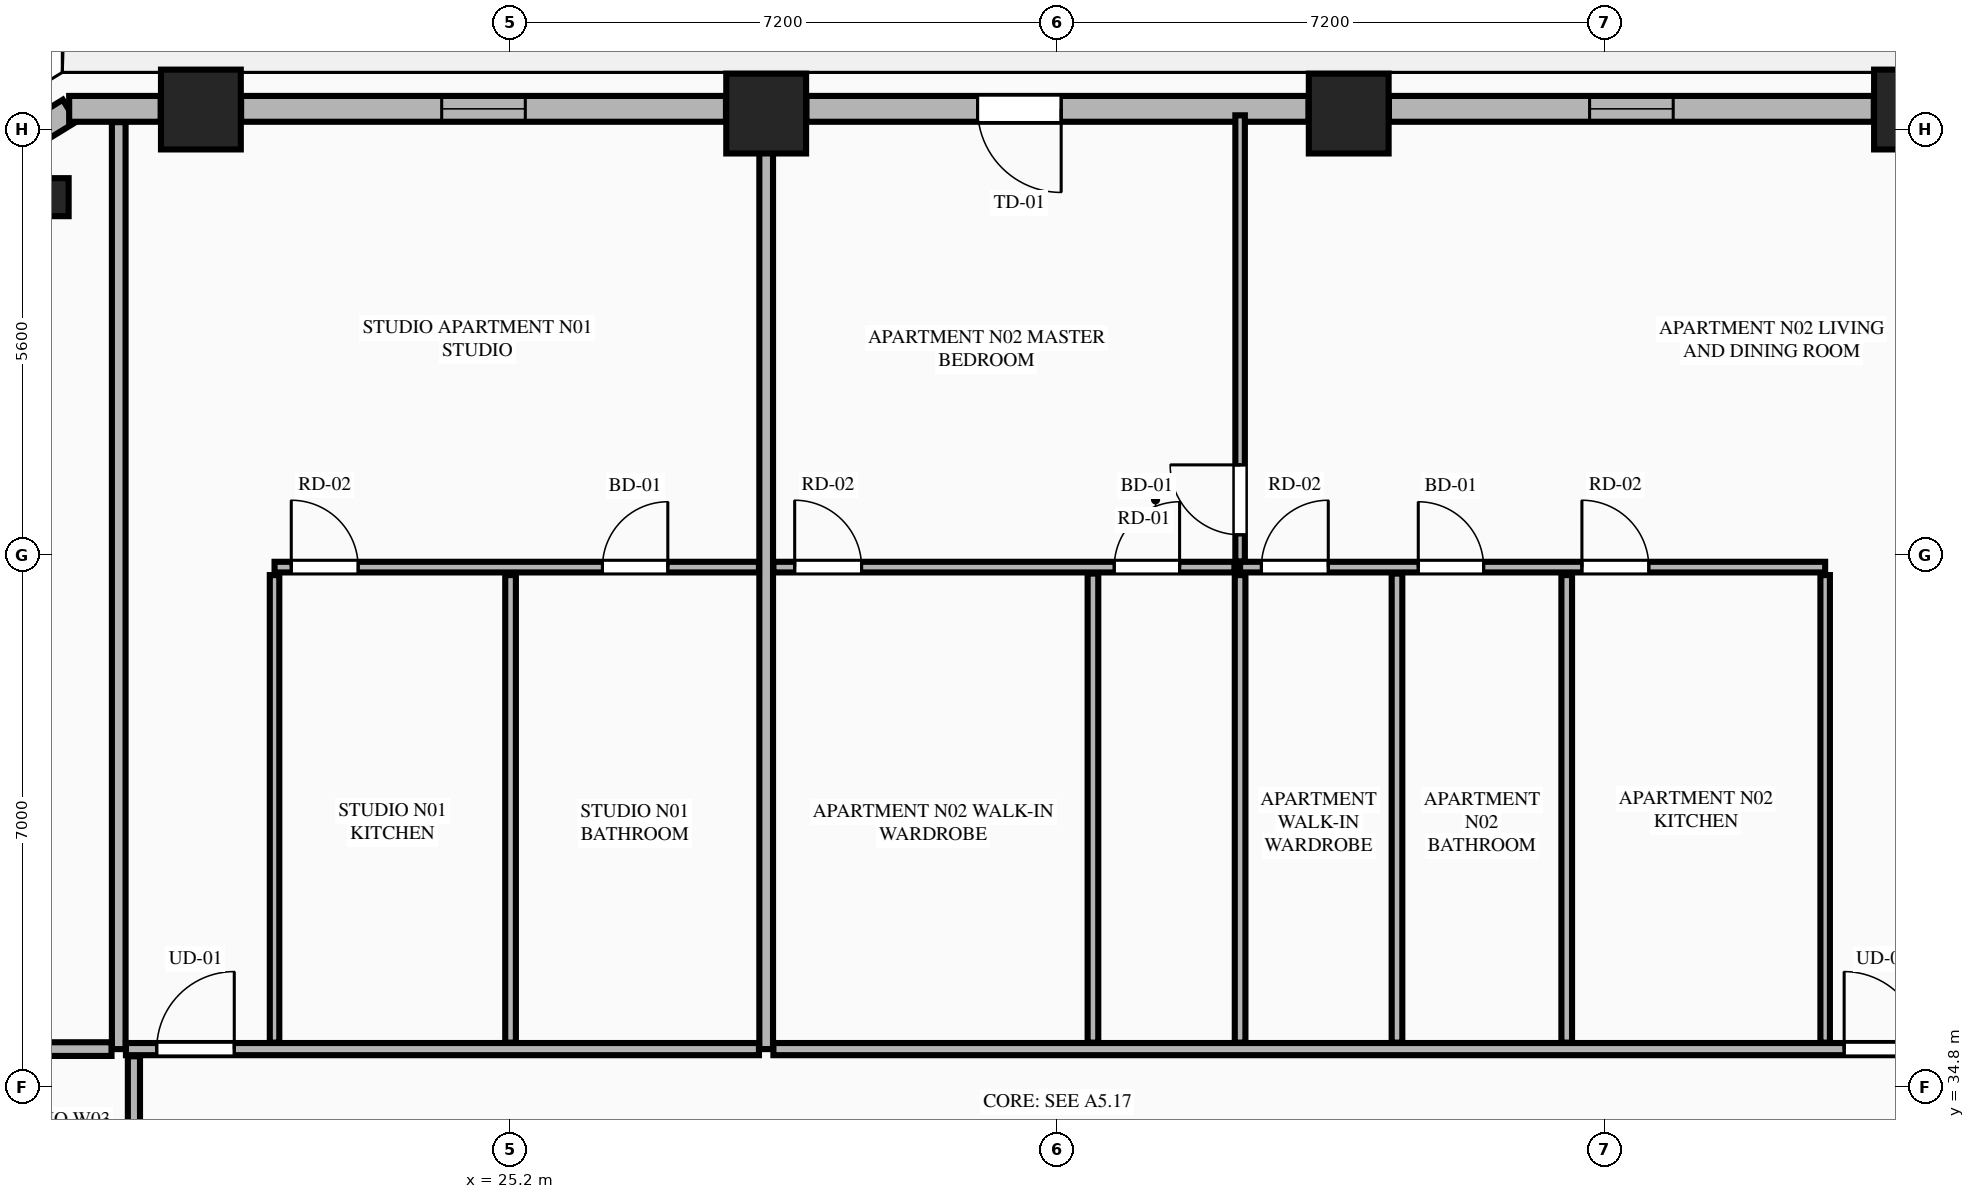
"""IFC4 building model, lengths in metres.
Left out: names, types, materials, properties, quantities, classifications, styles, units other than length and angle.
Written with IfcOpenShell. Run it as: python <this file> out.ifc"""

import sys

from ifc_helpers import new_model, si_unit, direction, frame, frame_2d, origin, origin_2d, place, context, subcontext, project, spatial, rectangle, extrude, element, fill, save


model = new_model("IFC4")
c1 = context("Model", 3, precision=1e-05, world=origin(), true_north=direction((0.0, 1.0)))
c2 = subcontext(c1, "Body", "Model", "MODEL_VIEW")
j1 = project(units=[si_unit("LENGTHUNIT", "METRE"), si_unit("PLANEANGLEUNIT", "RADIAN")], contexts=[c1])
p1 = place(None, origin())
s1 = spatial("IfcSite", under=j1, at=p1, CompositionType="ELEMENT")
p2 = place(p1, origin())
s2 = spatial("IfcBuilding", under=s1, at=p2, CompositionType="ELEMENT")
p3 = place(p2, frame((0.0, 0.0, 133.9)))
s3 = spatial("IfcBuildingStorey", under=s2, at=p3, CompositionType="ELEMENT", Elevation=133.9)
for number, where, z_axis, x_axis in (
    (1, (43.669, 47.661, 0.0), (0.0, 0.0, 1.0), (1.0, 0.0, 0.0)),
    (2, (36.232, 47.608, 0.0), (0.0, 0.0, 1.0), (1.0, 0.0, 0.0)),
    (3, (28.568, 47.608, 0.0), (0.0, 0.0, 1.0), (1.0, 0.0, 0.0)),
    (4, (21.131, 47.661, 0.0), (0.0, 0.0, 1.0), (1.0, 0.0, 0.0)),
):
    element("IfcColumn", number, at=place(p3, frame(where, z_axis=z_axis, x_axis=x_axis)), inside=s3, PredefinedType="COLUMN", context=c2, shape_type="SweptSolid", body=[
        extrude(rectangle(XDim=1.05, YDim=1.05, at=origin_2d()), origin(), (0.0, 0.0, 1.0), 3.55),
    ])
p4 = place(p3, frame((19.141, 46.508, 0.0), z_axis=(0.0, 0.0, 1.0), x_axis=(-0.865160173452, -0.501495637342, 0.0)))
e5 = element("IfcColumn", 5, at=p4, inside=s3, PredefinedType="PILASTER", context=c2, shape_type="SweptSolid", body=[
    extrude(rectangle(XDim=0.5, YDim=0.35, at=origin_2d()), origin(), (0.0, 0.0, 1.0), 3.55),
])
p5 = place(p3, frame((19.403, 47.645, 0.0), z_axis=(0.0, 0.0, 1.0), x_axis=(-0.851798915137, -0.523868884523, 0.0)))
e6 = element("IfcWall", 6, at=p5, inside=s3, PredefinedType="STANDARD", context=c2, shape_type="SweptSolid", body=[
    extrude(rectangle(XDim=1.848, YDim=0.34, at=frame_2d((0.924, 0.0))), origin(), (0.0, 0.0, 1.0), 3.34),
])
p6 = place(p3, frame((43.14, 47.67, 0.0), z_axis=(0.0, 0.0, 1.0), x_axis=(-1.0, 0.0, 0.0)))
e7 = element("IfcWall", 7, at=p6, inside=s3, PredefinedType="STANDARD", context=c2, shape_type="SweptSolid", body=[
    extrude(rectangle(XDim=6.379, YDim=0.34, at=frame_2d((3.189, 0.0))), origin(), (0.0, 0.0, 1.0), 2.797),
])
p7 = place(p6, frame((2.639, 0.0, 0.75)))
e8 = element("IfcOpeningElement", 8, at=p7, cuts=e7, PredefinedType="OPENING", context=c2, shape_type="SweptSolid", body=[
    extrude(rectangle(XDim=1.1, YDim=1.897, at=frame_2d((0.55, 0.948))), frame((0.0, 0.18, 0.0), z_axis=(0.0, -1.0, 0.0), x_axis=(1.0, 0.0, 0.0)), (0.0, 0.0, 1.0), 0.36),
])
p8 = place(p3, frame((35.703, 47.67, 0.0), z_axis=(0.0, 0.0, 1.0), x_axis=(-1.0, 0.0, 0.0)))
e9 = element("IfcWall", 9, at=p8, inside=s3, PredefinedType="STANDARD", context=c2, shape_type="SweptSolid", body=[
    extrude(rectangle(XDim=6.606, YDim=0.34, at=frame_2d((3.303, 0.0))), origin(), (0.0, 0.0, 1.0), 2.797),
])
p9 = place(p8, frame((3.254, 0.0, 0.0)))
e10 = element("IfcOpeningElement", 10, at=p9, cuts=e9, PredefinedType="OPENING", context=c2, shape_type="SweptSolid", body=[
    extrude(rectangle(XDim=1.1, YDim=2.25, at=frame_2d((0.55, 1.125))), frame((0.0, 0.18, 0.0), z_axis=(0.0, -1.0, 0.0), x_axis=(1.0, 0.0, 0.0)), (0.0, 0.0, 1.0), 0.36),
])
p10 = place(p3, frame((28.039, 47.67, 0.0), z_axis=(0.0, 0.0, 1.0), x_axis=(-1.0, 0.0, 0.0)))
e11 = element("IfcWall", 11, at=p10, inside=s3, PredefinedType="STANDARD", context=c2, shape_type="SweptSolid", body=[
    extrude(rectangle(XDim=6.379, YDim=0.34, at=frame_2d((3.189, 0.0))), origin(), (0.0, 0.0, 1.0), 2.797),
])
p11 = place(p10, frame((2.64, 0.0, 0.75)))
e12 = element("IfcOpeningElement", 12, at=p11, cuts=e11, PredefinedType="OPENING", context=c2, shape_type="SweptSolid", body=[
    extrude(rectangle(XDim=1.1, YDim=1.897, at=frame_2d((0.55, 0.948))), frame((0.0, 0.18, 0.0), z_axis=(0.0, -1.0, 0.0), x_axis=(1.0, 0.0, 0.0)), (0.0, 0.0, 1.0), 0.36),
])
p12 = place(p3, frame((20.602, 47.67, 0.0), z_axis=(0.0, 0.0, 1.0), x_axis=(-1.0, 0.0, 0.0)))
e13 = element("IfcWall", 13, at=p12, inside=s3, PredefinedType="STANDARD", context=c2, shape_type="SweptSolid", body=[
    extrude(rectangle(XDim=1.204, YDim=0.34, at=frame_2d((0.602, 0.0))), origin(), (0.0, 0.0, 1.0), 3.34),
])
p13 = place(p3, frame((20.05, 35.3, 0.0), z_axis=(0.0, 0.0, 1.0), x_axis=(0.0, 1.0, 0.0)))
e14 = element("IfcWall", 14, at=p13, inside=s3, PredefinedType="PARTITIONING", context=c2, shape_type="SweptSolid", body=[
    extrude(rectangle(XDim=12.195, YDim=0.18, at=frame_2d((6.098, 0.0))), origin(), (0.0, 0.0, 1.0), 3.34),
])
p14 = place(p3, frame((28.568, 35.3, 0.0), z_axis=(0.0, 0.0, 1.0), x_axis=(0.0, 1.0, 0.0)))
e15 = element("IfcWall", 15, at=p14, inside=s3, PredefinedType="PARTITIONING", context=c2, shape_type="SweptSolid", body=[
    extrude(rectangle(XDim=12.195, YDim=0.18, at=frame_2d((6.098, 0.0))), origin(), (0.0, 0.0, 1.0), 2.722),
])
p15 = place(p3, frame((20.145, 35.3, 0.0), z_axis=(0.0, 0.0, 1.0), x_axis=(1.0, 0.0, 0.0)))
e16 = element("IfcWall", 16, at=p15, inside=s3, PredefinedType="PARTITIONING", context=c2, shape_type="SweptSolid", body=[
    extrude(rectangle(XDim=8.328, YDim=0.16, at=frame_2d((4.164, 0.0))), origin(), (0.0, 0.0, 1.0), 3.34),
])
p16 = place(p15, frame((0.405, 0.0, 0.0)))
e17 = element("IfcOpeningElement", 17, at=p16, cuts=e16, PredefinedType="OPENING", context=c2, shape_type="SweptSolid", body=[
    extrude(rectangle(XDim=1.02, YDim=2.25, at=frame_2d((0.51, 1.125))), frame((0.0, 0.09, 0.0), z_axis=(0.0, -1.0, 0.0), x_axis=(1.0, 0.0, 0.0)), (0.0, 0.0, 1.0), 0.18),
])
p17 = place(p3, frame((22.1, 35.385, 0.0), z_axis=(0.0, 0.0, 1.0), x_axis=(0.0, 1.0, 0.0)))
e18 = element("IfcWall", 18, at=p17, inside=s3, PredefinedType="PARTITIONING", context=c2, shape_type="SweptSolid", body=[
    extrude(rectangle(XDim=6.151, YDim=0.125, at=frame_2d((3.075, 0.0))), origin(), (0.0, 0.0, 1.0), 2.722),
])
p18 = place(p3, frame((22.1, 41.641, 0.0), z_axis=(0.0, 0.0, 1.0), x_axis=(1.0, 0.0, 0.0)))
e19 = element("IfcWall", 19, at=p18, inside=s3, PredefinedType="PLUMBINGWALL", context=c2, shape_type="SweptSolid", body=[
    extrude(rectangle(XDim=6.373, YDim=0.14, at=frame_2d((3.187, 0.0))), origin(), (0.0, 0.0, 1.0), 3.34),
])
p19 = place(p18, frame((4.314, 0.0, 0.0)))
e20 = element("IfcOpeningElement", 20, at=p19, cuts=e19, PredefinedType="OPENING", context=c2, shape_type="SweptSolid", body=[
    extrude(rectangle(XDim=0.86, YDim=2.1, at=frame_2d((0.43, 1.05))), frame((0.0, 0.08, 0.0), z_axis=(0.0, -1.0, 0.0), x_axis=(1.0, 0.0, 0.0)), (0.0, 0.0, 1.0), 0.16),
])
p20 = place(p18, frame((0.22, 0.0, 0.0)))
e21 = element("IfcOpeningElement", 21, at=p20, cuts=e19, PredefinedType="OPENING", context=c2, shape_type="SweptSolid", body=[
    extrude(rectangle(XDim=0.88, YDim=2.15, at=frame_2d((0.44, 1.075))), frame((0.0, 0.08, 0.0), z_axis=(0.0, -1.0, 0.0), x_axis=(1.0, 0.0, 0.0)), (0.0, 0.0, 1.0), 0.16),
])
p21 = place(p3, frame((25.205, 35.385, 0.0), z_axis=(0.0, 0.0, 1.0), x_axis=(0.0, 1.0, 0.0)))
e22 = element("IfcWall", 22, at=p21, inside=s3, PredefinedType="PLUMBINGWALL", context=c2, shape_type="SweptSolid", body=[
    extrude(rectangle(XDim=6.151, YDim=0.14, at=frame_2d((3.075, 0.0))), origin(), (0.0, 0.0, 1.0), 3.34),
])
p22 = place(p3, frame((28.663, 35.3, 0.0), z_axis=(0.0, 0.0, 1.0), x_axis=(1.0, 0.0, 0.0)))
e23 = element("IfcWall", 23, at=p22, inside=s3, PredefinedType="PARTITIONING", context=c2, shape_type="SweptSolid", body=[
    extrude(rectangle(XDim=15.992, YDim=0.16, at=frame_2d((7.996, 0.0))), origin(), (0.0, 0.0, 1.0), 3.34),
])
p23 = place(p22, frame((14.087, 0.0, 0.0)))
e24 = element("IfcOpeningElement", 24, at=p23, cuts=e23, PredefinedType="OPENING", context=c2, shape_type="SweptSolid", body=[
    extrude(rectangle(XDim=1.02, YDim=2.25, at=frame_2d((0.51, 1.125))), frame((0.0, 0.09, 0.0), z_axis=(0.0, -1.0, 0.0), x_axis=(1.0, 0.0, 0.0)), (0.0, 0.0, 1.0), 0.18),
])
p24 = place(p3, frame((42.5, 35.385, 0.0), z_axis=(0.0, 0.0, 1.0), x_axis=(0.0, 1.0, 0.0)))
e25 = element("IfcWall", 25, at=p24, inside=s3, PredefinedType="PARTITIONING", context=c2, shape_type="SweptSolid", body=[
    extrude(rectangle(XDim=6.151, YDim=0.125, at=frame_2d((3.075, 0.0))), origin(), (0.0, 0.0, 1.0), 2.722),
])
p25 = place(p3, frame((34.803, 41.641, 0.0), z_axis=(0.0, 0.0, 1.0), x_axis=(1.0, 0.0, 0.0)))
e26 = element("IfcWall", 26, at=p25, inside=s3, PredefinedType="PLUMBINGWALL", context=c2, shape_type="SweptSolid", body=[
    extrude(rectangle(XDim=7.697, YDim=0.14, at=frame_2d((3.849, 0.0))), origin(), (0.0, 0.0, 1.0), 3.34),
])
p26 = place(p25, frame((0.28, 0.0, 0.0)))
e27 = element("IfcOpeningElement", 27, at=p26, cuts=e26, PredefinedType="OPENING", context=c2, shape_type="SweptSolid", body=[
    extrude(rectangle(XDim=0.88, YDim=2.15, at=frame_2d((0.44, 1.075))), frame((0.0, 0.08, 0.0), z_axis=(0.0, -1.0, 0.0), x_axis=(1.0, 0.0, 0.0)), (0.0, 0.0, 1.0), 0.16),
])
p27 = place(p25, frame((2.344, 0.0, 0.0)))
e28 = element("IfcOpeningElement", 28, at=p27, cuts=e26, PredefinedType="OPENING", context=c2, shape_type="SweptSolid", body=[
    extrude(rectangle(XDim=0.86, YDim=2.1, at=frame_2d((0.43, 1.05))), frame((0.0, 0.08, 0.0), z_axis=(0.0, -1.0, 0.0), x_axis=(1.0, 0.0, 0.0)), (0.0, 0.0, 1.0), 0.16),
])
p28 = place(p25, frame((4.497, 0.0, 0.0)))
e29 = element("IfcOpeningElement", 29, at=p28, cuts=e26, PredefinedType="OPENING", context=c2, shape_type="SweptSolid", body=[
    extrude(rectangle(XDim=0.88, YDim=2.15, at=frame_2d((0.44, 1.075))), frame((0.0, 0.08, 0.0), z_axis=(0.0, -1.0, 0.0), x_axis=(1.0, 0.0, 0.0)), (0.0, 0.0, 1.0), 0.16),
])
p29 = place(p3, frame((28.663, 41.641, 0.0), z_axis=(0.0, 0.0, 1.0), x_axis=(1.0, 0.0, 0.0)))
e30 = element("IfcWall", 30, at=p29, inside=s3, PredefinedType="PLUMBINGWALL", context=c2, shape_type="SweptSolid", body=[
    extrude(rectangle(XDim=6.065, YDim=0.14, at=frame_2d((3.032, 0.0))), origin(), (0.0, 0.0, 1.0), 3.34),
])
p30 = place(p29, frame((0.28, 0.0, 0.0)))
e31 = element("IfcOpeningElement", 31, at=p30, cuts=e30, PredefinedType="OPENING", context=c2, shape_type="SweptSolid", body=[
    extrude(rectangle(XDim=0.88, YDim=2.15, at=frame_2d((0.44, 1.075))), frame((0.0, 0.08, 0.0), z_axis=(0.0, -1.0, 0.0), x_axis=(1.0, 0.0, 0.0)), (0.0, 0.0, 1.0), 0.16),
])
p31 = place(p29, frame((4.484, 0.0, 0.0)))
e32 = element("IfcOpeningElement", 32, at=p31, cuts=e30, PredefinedType="OPENING", context=c2, shape_type="SweptSolid", body=[
    extrude(rectangle(XDim=0.86, YDim=2.1, at=frame_2d((0.43, 1.05))), frame((0.0, 0.08, 0.0), z_axis=(0.0, -1.0, 0.0), x_axis=(1.0, 0.0, 0.0)), (0.0, 0.0, 1.0), 0.16),
])
for number, where, z_axis, x_axis in (
    (33, (39.1, 35.385, 0.0), (0.0, 0.0, 1.0), (0.0, 1.0, 0.0)),
    (34, (34.803, 35.385, 0.0), (0.0, 0.0, 1.0), (0.0, 1.0, 0.0)),
):
    element("IfcWall", number, at=place(p3, frame(where, z_axis=z_axis, x_axis=x_axis)), inside=s3, PredefinedType="PLUMBINGWALL", context=c2, shape_type="SweptSolid", body=[
        extrude(rectangle(XDim=6.151, YDim=0.14, at=frame_2d((3.075, 0.0))), origin(), (0.0, 0.0, 1.0), 3.34),
    ])
p32 = place(p3, frame((34.803, 41.716, 0.0), z_axis=(0.0, 0.0, 1.0), x_axis=(0.0, 1.0, 0.0)))
e35 = element("IfcWall", 35, at=p32, inside=s3, PredefinedType="PARTITIONING", context=c2, shape_type="SweptSolid", body=[
    extrude(rectangle(XDim=5.869, YDim=0.125, at=frame_2d((2.935, 0.0))), origin(), (0.0, 0.0, 1.0), 3.34),
])
p33 = place(p32, frame((0.35, 0.0, 0.0)))
e36 = element("IfcOpeningElement", 36, at=p33, cuts=e35, PredefinedType="OPENING", context=c2, shape_type="SweptSolid", body=[
    extrude(rectangle(XDim=0.92, YDim=2.15, at=frame_2d((0.46, 1.075))), frame((0.0, 0.073, 0.0), z_axis=(0.0, -1.0, 0.0), x_axis=(1.0, 0.0, 0.0)), (0.0, 0.0, 1.0), 0.145),
])
for number, where, z_axis, x_axis in (
    (37, (36.867, 35.385, 0.0), (0.0, 0.0, 1.0), (0.0, 1.0, 0.0)),
    (38, (32.867, 35.385, 0.0), (0.0, 0.0, 1.0), (0.0, 1.0, 0.0)),
):
    element("IfcWall", number, at=place(p3, frame(where, z_axis=z_axis, x_axis=x_axis)), inside=s3, PredefinedType="PLUMBINGWALL", context=c2, shape_type="SweptSolid", body=[
        extrude(rectangle(XDim=6.171, YDim=0.14, at=frame_2d((3.085, 0.0))), origin(), (0.0, 0.0, 1.0), 3.34),
    ])
p34 = place(p3, frame((12.286, 35.3, 0.0), z_axis=(0.0, 0.0, 1.0), x_axis=(1.0, 0.0, 0.0)))
e39 = element("IfcWall", 39, at=p34, inside=s3, PredefinedType="PARTITIONING", context=c2, shape_type="SweptSolid", body=[
    extrude(rectangle(XDim=7.669, YDim=0.18, at=frame_2d((3.834, 0.0))), origin(), (0.0, 0.0, 1.0), 3.34),
])
p35 = place(p3, frame((20.25, 29.379, 0.0), z_axis=(0.0, 0.0, 1.0), x_axis=(0.0, 1.0, 0.0)))
e40 = element("IfcWall", 40, at=p35, inside=s3, PredefinedType="PARTITIONING", context=c2, shape_type="SweptSolid", body=[
    extrude(rectangle(XDim=5.826, YDim=0.16, at=frame_2d((2.913, 0.0))), origin(), (0.0, 0.0, 1.0), 3.34),
])
p36 = place(p35, frame((0.4, 0.0, 0.0)))
e41 = element("IfcOpeningElement", 41, at=p36, cuts=e40, PredefinedType="OPENING", context=c2, shape_type="SweptSolid", body=[
    extrude(rectangle(XDim=1.02, YDim=2.25, at=frame_2d((0.51, 1.125))), frame((0.0, 0.09, 0.0), z_axis=(0.0, -1.0, 0.0), x_axis=(1.0, 0.0, 0.0)), (0.0, 0.0, 1.0), 0.18),
])
p37 = place(p7, origin())
e42 = element("IfcWindow", 42, at=p37, inside=s3, PartitioningType="SINGLE_PANEL", PredefinedType="WINDOW", context=c2, shape_type="SweptSolid", body=[
    extrude(rectangle(XDim=1.1, YDim=1.897, at=frame_2d((0.55, 0.948))), frame((0.0, 0.03, 0.0), z_axis=(0.0, -1.0, 0.0), x_axis=(1.0, 0.0, 0.0)), (0.0, 0.0, 1.0), 0.06),
])
fill(e8, e42)
p38 = place(p9, origin())
e43 = element("IfcDoor", 43, at=p38, inside=s3, OperationType="SINGLE_SWING_LEFT", PredefinedType="DOOR", context=c2, shape_type="SweptSolid", body=[
    extrude(rectangle(XDim=1.1, YDim=2.25, at=frame_2d((0.55, 1.125))), frame((0.0, 0.025, 0.0), z_axis=(0.0, -1.0, 0.0), x_axis=(1.0, 0.0, 0.0)), (0.0, 0.0, 1.0), 0.05),
])
fill(e10, e43)
p39 = place(p11, origin())
e44 = element("IfcWindow", 44, at=p39, inside=s3, PartitioningType="SINGLE_PANEL", PredefinedType="WINDOW", context=c2, shape_type="SweptSolid", body=[
    extrude(rectangle(XDim=1.1, YDim=1.897, at=frame_2d((0.55, 0.948))), frame((0.0, 0.03, 0.0), z_axis=(0.0, -1.0, 0.0), x_axis=(1.0, 0.0, 0.0)), (0.0, 0.0, 1.0), 0.06),
])
fill(e12, e44)
p40 = place(p19, origin())
e45 = element("IfcDoor", 45, at=p40, inside=s3, OperationType="SINGLE_SWING_RIGHT", PredefinedType="DOOR", context=c2, shape_type="SweptSolid", body=[
    extrude(rectangle(XDim=0.86, YDim=2.1, at=frame_2d((0.43, 1.05))), frame((0.0, 0.025, 0.0), z_axis=(0.0, -1.0, 0.0), x_axis=(1.0, 0.0, 0.0)), (0.0, 0.0, 1.0), 0.05),
])
fill(e20, e45)
p41 = place(p16, origin())
e46 = element("IfcDoor", 46, at=p41, inside=s3, OperationType="SINGLE_SWING_RIGHT", PredefinedType="DOOR", context=c2, shape_type="SweptSolid", body=[
    extrude(rectangle(XDim=1.02, YDim=2.25, at=frame_2d((0.51, 1.125))), frame((0.0, 0.025, 0.0), z_axis=(0.0, -1.0, 0.0), x_axis=(1.0, 0.0, 0.0)), (0.0, 0.0, 1.0), 0.05),
])
fill(e17, e46)
p42 = place(p20, origin())
e47 = element("IfcDoor", 47, at=p42, inside=s3, OperationType="SINGLE_SWING_LEFT", PredefinedType="DOOR", context=c2, shape_type="SweptSolid", body=[
    extrude(rectangle(XDim=0.88, YDim=2.15, at=frame_2d((0.44, 1.075))), frame((0.0, 0.025, 0.0), z_axis=(0.0, -1.0, 0.0), x_axis=(1.0, 0.0, 0.0)), (0.0, 0.0, 1.0), 0.05),
])
fill(e21, e47)
p43 = place(p26, origin())
e48 = element("IfcDoor", 48, at=p43, inside=s3, OperationType="SINGLE_SWING_RIGHT", PredefinedType="DOOR", context=c2, shape_type="SweptSolid", body=[
    extrude(rectangle(XDim=0.88, YDim=2.15, at=frame_2d((0.44, 1.075))), frame((0.0, 0.025, 0.0), z_axis=(0.0, -1.0, 0.0), x_axis=(1.0, 0.0, 0.0)), (0.0, 0.0, 1.0), 0.05),
])
fill(e27, e48)
p44 = place(p27, origin())
e49 = element("IfcDoor", 49, at=p44, inside=s3, OperationType="SINGLE_SWING_LEFT", PredefinedType="DOOR", context=c2, shape_type="SweptSolid", body=[
    extrude(rectangle(XDim=0.86, YDim=2.1, at=frame_2d((0.43, 1.05))), frame((0.0, 0.025, 0.0), z_axis=(0.0, -1.0, 0.0), x_axis=(1.0, 0.0, 0.0)), (0.0, 0.0, 1.0), 0.05),
])
fill(e28, e49)
p45 = place(p30, origin())
e50 = element("IfcDoor", 50, at=p45, inside=s3, OperationType="SINGLE_SWING_LEFT", PredefinedType="DOOR", context=c2, shape_type="SweptSolid", body=[
    extrude(rectangle(XDim=0.88, YDim=2.15, at=frame_2d((0.44, 1.075))), frame((0.0, 0.025, 0.0), z_axis=(0.0, -1.0, 0.0), x_axis=(1.0, 0.0, 0.0)), (0.0, 0.0, 1.0), 0.05),
])
fill(e31, e50)
p46 = place(p31, origin())
e51 = element("IfcDoor", 51, at=p46, inside=s3, OperationType="SINGLE_SWING_RIGHT", PredefinedType="DOOR", context=c2, shape_type="SweptSolid", body=[
    extrude(rectangle(XDim=0.86, YDim=2.1, at=frame_2d((0.43, 1.05))), frame((0.0, 0.025, 0.0), z_axis=(0.0, -1.0, 0.0), x_axis=(1.0, 0.0, 0.0)), (0.0, 0.0, 1.0), 0.05),
])
fill(e32, e51)
p47 = place(p23, origin())
e52 = element("IfcDoor", 52, at=p47, inside=s3, OperationType="SINGLE_SWING_LEFT", PredefinedType="DOOR", context=c2, shape_type="SweptSolid", body=[
    extrude(rectangle(XDim=1.02, YDim=2.25, at=frame_2d((0.51, 1.125))), frame((0.0, 0.025, 0.0), z_axis=(0.0, -1.0, 0.0), x_axis=(1.0, 0.0, 0.0)), (0.0, 0.0, 1.0), 0.05),
])
fill(e24, e52)
p48 = place(p28, origin())
e53 = element("IfcDoor", 53, at=p48, inside=s3, OperationType="SINGLE_SWING_LEFT", PredefinedType="DOOR", context=c2, shape_type="SweptSolid", body=[
    extrude(rectangle(XDim=0.88, YDim=2.15, at=frame_2d((0.44, 1.075))), frame((0.0, 0.025, 0.0), z_axis=(0.0, -1.0, 0.0), x_axis=(1.0, 0.0, 0.0)), (0.0, 0.0, 1.0), 0.05),
])
fill(e29, e53)
p49 = place(p33, origin())
e54 = element("IfcDoor", 54, at=p49, inside=s3, OperationType="SINGLE_SWING_RIGHT", PredefinedType="DOOR", context=c2, shape_type="SweptSolid", body=[
    extrude(rectangle(XDim=0.92, YDim=2.15, at=frame_2d((0.46, 1.075))), frame((0.0, 0.025, 0.0), z_axis=(0.0, -1.0, 0.0), x_axis=(1.0, 0.0, 0.0)), (0.0, 0.0, 1.0), 0.05),
])
fill(e36, e54)
save(model, sys.argv[1])
